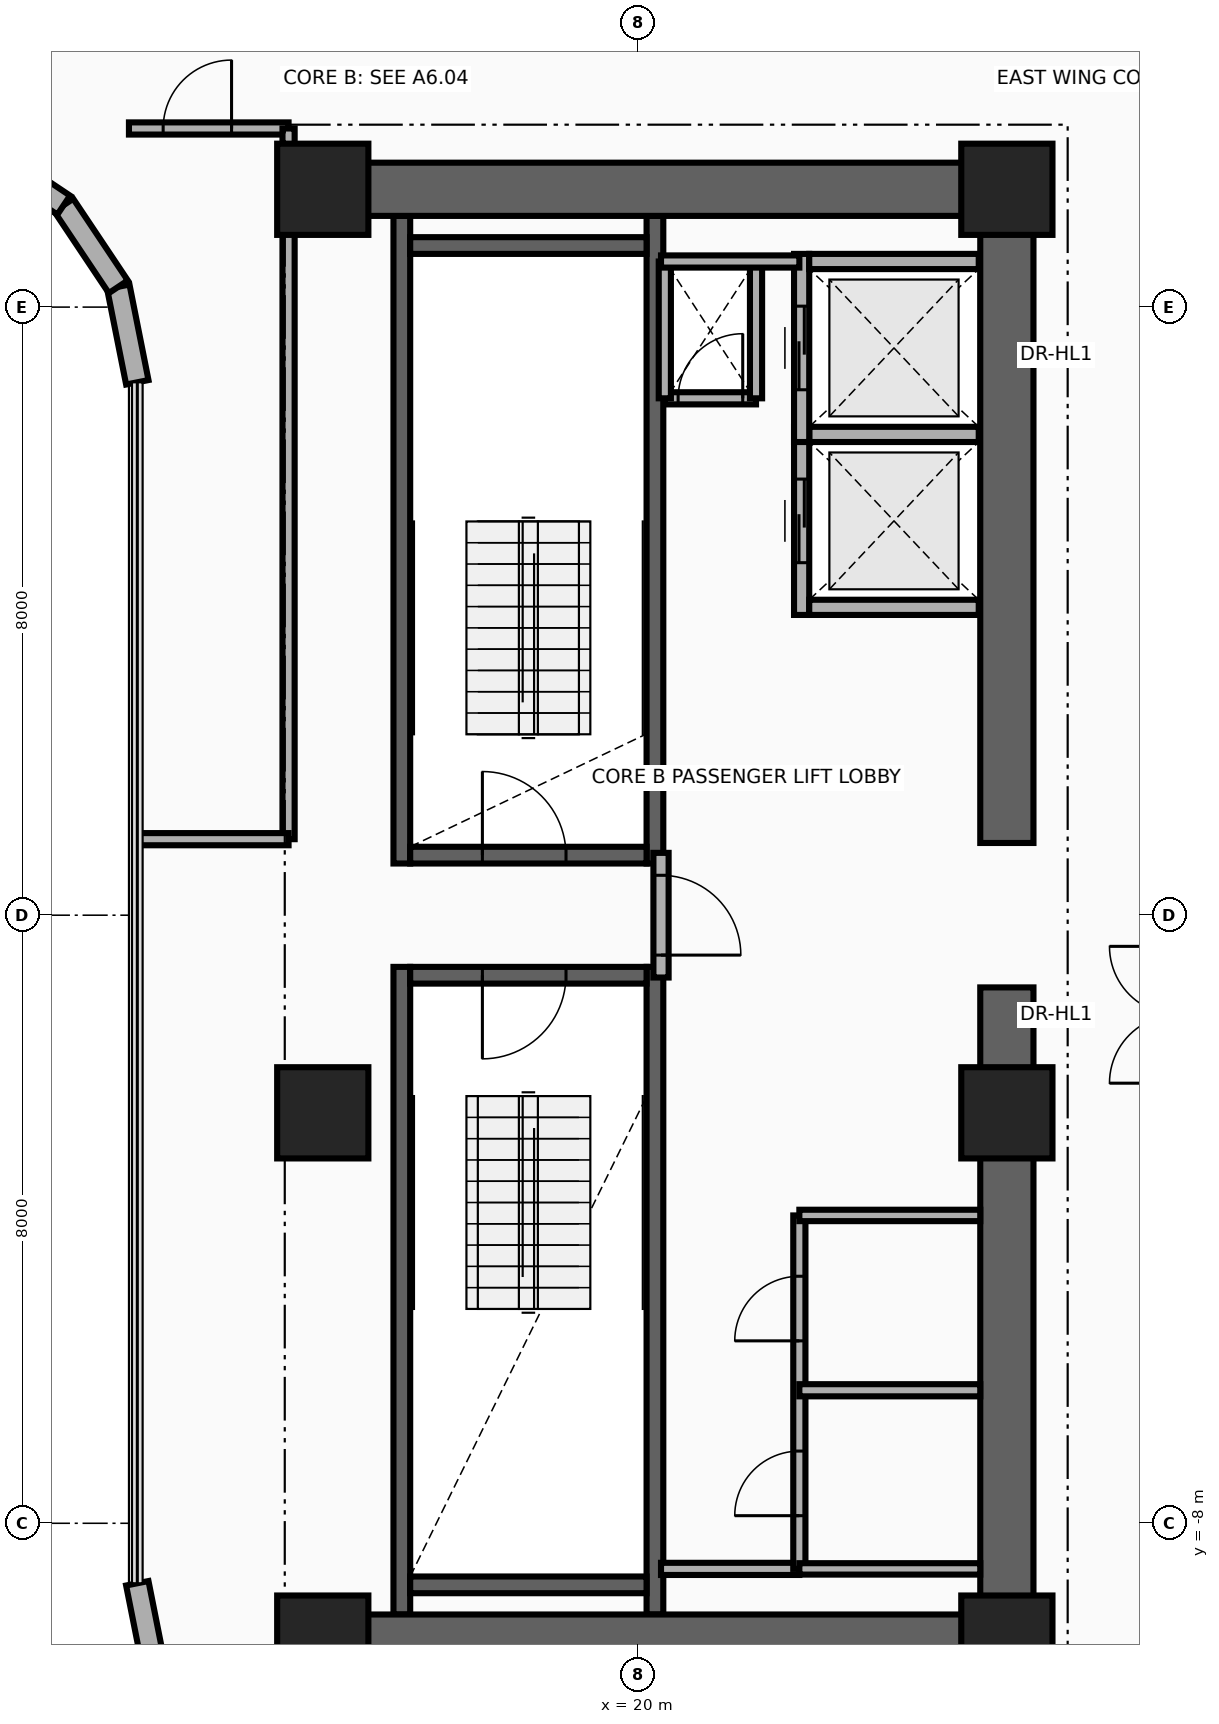
"""IFC4 building model, lengths in metres.
Left out: names, types, materials, properties, quantities, classifications, styles, units other than length and angle.
Written with IfcOpenShell. Run it as: python <this file> out.ifc"""

import sys

from ifc_helpers import new_model, si_unit, direction, frame, frame_2d, origin, origin_2d, place, context, subcontext, project, spatial, rectangle, extrude, source, transform, mapped, element, fill, save


model = new_model("IFC4")
c1 = context("Model", 3, precision=1e-05, world=origin(), true_north=direction((0.0, 1.0)))
c2 = subcontext(c1, "Body", "Model", "MODEL_VIEW")
j1 = project(units=[si_unit("LENGTHUNIT", "METRE"), si_unit("PLANEANGLEUNIT", "RADIAN")], contexts=[c1])
p1 = place(None, origin())
s1 = spatial("IfcSite", under=j1, at=p1, CompositionType="ELEMENT")
p2 = place(p1, origin())
s2 = spatial("IfcBuilding", under=s1, at=p2, CompositionType="ELEMENT")
p3 = place(p2, frame((0.0, 0.0, 131.6)))
s3 = spatial("IfcBuildingStorey", under=s2, at=p3, CompositionType="ELEMENT", Elevation=131.6)
for number, where, z_axis, x_axis in (
    (1, (16.89, 0.68, 0.0), (0.0, 0.0, 1.0), (0.0, 1.0, 0.0)),
    (2, (20.22, 0.68, 0.0), (0.0, 0.0, 1.0), (0.0, 1.0, 0.0)),
):
    element("IfcWall", number, at=place(p3, frame(where, z_axis=z_axis, x_axis=x_axis)), inside=s3, PredefinedType="SHEAR", context=c2, shape_type="SweptSolid", body=[
        extrude(rectangle(XDim=8.52, YDim=0.22, at=frame_2d((4.26, 0.0))), origin(), (0.0, 0.0, 1.0), 3.46),
    ])
p4 = place(p3, frame((17.0, 0.79, 0.0), z_axis=(0.0, 0.0, 1.0), x_axis=(1.0, 0.0, 0.0)))
e3 = element("IfcWall", 3, at=p4, inside=s3, PredefinedType="SHEAR", context=c2, shape_type="SweptSolid", body=[
    extrude(rectangle(XDim=3.11, YDim=0.22, at=frame_2d((1.555, 0.0))), origin(), (0.0, 0.0, 1.0), 3.46),
])
p5 = place(p4, frame((0.95, 0.0, 0.0)))
e4 = element("IfcOpeningElement", 4, at=p5, cuts=e3, PredefinedType="OPENING", context=c2, shape_type="SweptSolid", body=[
    extrude(rectangle(XDim=1.1, YDim=2.15, at=frame_2d((0.55, 1.075))), frame((0.0, 0.125, 0.0), z_axis=(0.0, -1.0, 0.0), x_axis=(1.0, 0.0, 0.0)), (0.0, 0.0, 1.0), 0.25),
])
p6 = place(p3, frame((17.0, 8.81, 0.0), z_axis=(0.0, 0.0, 1.0), x_axis=(1.0, 0.0, 0.0)))
e5 = element("IfcWall", 5, at=p6, inside=s3, PredefinedType="SHEAR", context=c2, shape_type="SweptSolid", body=[
    extrude(rectangle(XDim=3.11, YDim=0.22, at=frame_2d((1.555, 0.0))), origin(), (0.0, 0.0, 1.0), 3.46),
])
for number, where, z_axis, x_axis in (
    (6, (16.89, -9.2, 0.0), (0.0, 0.0, 1.0), (0.0, 1.0, 0.0)),
    (7, (20.22, -9.2, 0.0), (0.0, 0.0, 1.0), (0.0, 1.0, 0.0)),
):
    element("IfcWall", number, at=place(p3, frame(where, z_axis=z_axis, x_axis=x_axis)), inside=s3, PredefinedType="SHEAR", context=c2, shape_type="SweptSolid", body=[
        extrude(rectangle(XDim=8.52, YDim=0.22, at=frame_2d((4.26, 0.0))), origin(), (0.0, 0.0, 1.0), 3.46),
    ])
p7 = place(p3, frame((17.0, -8.81, 0.0), z_axis=(0.0, 0.0, 1.0), x_axis=(1.0, 0.0, 0.0)))
e8 = element("IfcWall", 8, at=p7, inside=s3, PredefinedType="SHEAR", context=c2, shape_type="SweptSolid", body=[
    extrude(rectangle(XDim=3.11, YDim=0.22, at=frame_2d((1.555, 0.0))), origin(), (0.0, 0.0, 1.0), 3.46),
])
p8 = place(p3, frame((17.0, -0.79, 0.0), z_axis=(0.0, 0.0, 1.0), x_axis=(1.0, 0.0, 0.0)))
e9 = element("IfcWall", 9, at=p8, inside=s3, PredefinedType="SHEAR", context=c2, shape_type="SweptSolid", body=[
    extrude(rectangle(XDim=3.11, YDim=0.22, at=frame_2d((1.555, 0.0))), origin(), (0.0, 0.0, 1.0), 3.46),
])
p9 = place(p8, frame((0.95, 0.0, 0.0)))
e10 = element("IfcOpeningElement", 10, at=p9, cuts=e9, PredefinedType="OPENING", context=c2, shape_type="SweptSolid", body=[
    extrude(rectangle(XDim=1.1, YDim=2.15, at=frame_2d((0.55, 1.075))), frame((0.0, 0.125, 0.0), z_axis=(0.0, -1.0, 0.0), x_axis=(1.0, 0.0, 0.0)), (0.0, 0.0, 1.0), 0.25),
])
for number, where, z_axis, x_axis in (
    (11, (24.85, -9.9, 0.0), (0.0, 0.0, 1.0), (0.0, 1.0, 0.0)),
    (12, (24.85, 0.95, 0.0), (0.0, 0.0, 1.0), (0.0, 1.0, 0.0)),
):
    element("IfcWall", number, at=place(p3, frame(where, z_axis=z_axis, x_axis=x_axis)), inside=s3, PredefinedType="SHEAR", context=c2, shape_type="SweptSolid", body=[
        extrude(rectangle(XDim=8.95, YDim=0.7, at=frame_2d((4.475, 0.0))), origin(), (0.0, 0.0, 1.0), 3.46),
    ])
for number, where, z_axis, x_axis in (
    (13, (15.85, 9.55, 0.0), (0.0, 0.0, 1.0), (1.0, 0.0, 0.0)),
    (14, (15.85, -9.55, 0.0), (0.0, 0.0, 1.0), (1.0, 0.0, 0.0)),
):
    element("IfcWall", number, at=place(p3, frame(where, z_axis=z_axis, x_axis=x_axis)), inside=s3, PredefinedType="SHEAR", context=c2, shape_type="SweptSolid", body=[
        extrude(rectangle(XDim=9.0, YDim=0.7, at=frame_2d((4.5, 0.0))), origin(), (0.0, 0.0, 1.0), 3.46),
    ])
m1 = source(origin(), c2, "Body", "SweptSolid", [
    extrude(rectangle(XDim=1.2, YDim=1.2, at=origin_2d()), origin(), (0.0, 0.0, 1.0), 3.7),
])
for number, where, z_axis, x_axis in (
    (15, (15.85, -9.55, 0.0), (0.0, 0.0, 1.0), (1.0, 0.0, 0.0)),
    (16, (24.85, -9.55, 0.0), (0.0, 0.0, 1.0), (1.0, 0.0, 0.0)),
    (17, (15.85, -2.6, 0.0), (0.0, 0.0, 1.0), (1.0, 0.0, 0.0)),
    (18, (24.85, -2.6, 0.0), (0.0, 0.0, 1.0), (1.0, 0.0, 0.0)),
    (19, (15.85, 9.55, 0.0), (0.0, 0.0, 1.0), (1.0, 0.0, 0.0)),
    (20, (24.85, 9.55, 0.0), (0.0, 0.0, 1.0), (1.0, 0.0, 0.0)),
):
    element("IfcColumn", number, at=place(p3, frame(where, z_axis=z_axis, x_axis=x_axis)), inside=s3, PredefinedType="COLUMN", context=c2, shape_type="MappedRepresentation", body=[
        mapped(m1, transform((0.0, 0.0, 0.0), x_axis=(1.0, 0.0, 0.0), y_axis=(0.0, 1.0, 0.0), z_axis=(0.0, 0.0, 1.0), scale=1.0)),
    ])
p10 = place(p3, frame((13.647, -9.982, 0.0), z_axis=(0.0, 0.0, 1.0), x_axis=(-0.195189223115, 0.980765602568, 0.0)))
e21 = element("IfcWall", 21, at=p10, inside=s3, PredefinedType="SOLIDWALL", context=c2, shape_type="SweptSolid", body=[
    extrude(rectangle(XDim=1.216, YDim=0.3, at=frame_2d((0.608, 0.0))), origin(), (0.0, 0.0, 1.0), 3.46),
])
p11 = place(p3, frame((13.41, 7.011, 0.0), z_axis=(0.0, 0.0, 1.0), x_axis=(-0.195090163074, 0.980785312019, 0.0)))
e22 = element("IfcWall", 22, at=p11, inside=s3, PredefinedType="SOLIDWALL", context=c2, shape_type="SweptSolid", body=[
    extrude(rectangle(XDim=1.281, YDim=0.3, at=frame_2d((0.641, 0.0))), origin(), (0.0, 0.0, 1.0), 3.46),
])
for number, where, z_axis, x_axis in (
    (23, (13.16, 8.268, 0.0), (0.0, 0.0, 1.0), (-0.556, 0.831, 0.0)),
    (24, (12.442, 9.342, 0.0), (0.0, 0.0, 1.0), (-0.831, 0.556, 0.0)),
):
    element("IfcWall", number, at=place(p3, frame(where, z_axis=z_axis, x_axis=x_axis)), inside=s3, PredefinedType="SOLIDWALL", context=c2, shape_type="SweptSolid", body=[
        extrude(rectangle(XDim=1.292, YDim=0.3, at=frame_2d((0.646, 0.0))), origin(), (0.0, 0.0, 1.0), 3.46),
    ])
p12 = place(p3, frame((22.15, 3.95, 0.0), z_axis=(0.0, 0.0, 1.0), x_axis=(0.0, 1.0, 0.0)))
e25 = element("IfcWall", 25, at=p12, inside=s3, PredefinedType="MOVABLE", context=c2, shape_type="SweptSolid", body=[
    extrude(rectangle(XDim=2.475, YDim=0.2, at=frame_2d((1.238, 0.0))), origin(), (0.0, 0.0, 1.0), 3.46),
])
p13 = place(p12, frame((0.688, 0.0, 0.0)))
e26 = element("IfcOpeningElement", 26, at=p13, cuts=e25, PredefinedType="OPENING", context=c2, shape_type="SweptSolid", body=[
    extrude(rectangle(XDim=1.1, YDim=2.1, at=frame_2d((0.55, 1.05))), frame((0.0, 0.115, 0.0), z_axis=(0.0, -1.0, 0.0), x_axis=(1.0, 0.0, 0.0)), (0.0, 0.0, 1.0), 0.23),
])
for number, where, z_axis, x_axis in (
    (27, (22.25, 4.05, 0.0), (0.0, 0.0, 1.0), (1.0, 0.0, 0.0)),
    (28, (22.25, 6.325, 0.0), (0.0, 0.0, 1.0), (1.0, 0.0, 0.0)),
):
    element("IfcWall", number, at=place(p3, frame(where, z_axis=z_axis, x_axis=x_axis)), inside=s3, PredefinedType="MOVABLE", context=c2, shape_type="SweptSolid", body=[
        extrude(rectangle(XDim=2.23, YDim=0.2, at=frame_2d((1.115, 0.0))), origin(), (0.0, 0.0, 1.0), 2.245),
    ])
p14 = place(p3, frame((22.15, 6.225, 0.0), z_axis=(0.0, 0.0, 1.0), x_axis=(0.0, 1.0, 0.0)))
e29 = element("IfcWall", 29, at=p14, inside=s3, PredefinedType="MOVABLE", context=c2, shape_type="SweptSolid", body=[
    extrude(rectangle(XDim=2.475, YDim=0.2, at=frame_2d((1.237, 0.0))), origin(), (0.0, 0.0, 1.0), 3.46),
])
p15 = place(p14, frame((0.688, 0.0, 0.0)))
e30 = element("IfcOpeningElement", 30, at=p15, cuts=e29, PredefinedType="OPENING", context=c2, shape_type="SweptSolid", body=[
    extrude(rectangle(XDim=1.1, YDim=2.1, at=frame_2d((0.55, 1.05))), frame((0.0, 0.115, 0.0), z_axis=(0.0, -1.0, 0.0), x_axis=(1.0, 0.0, 0.0)), (0.0, 0.0, 1.0), 0.23),
])
p16 = place(p3, frame((22.25, 8.6, 0.0), z_axis=(0.0, 0.0, 1.0), x_axis=(1.0, 0.0, 0.0)))
e31 = element("IfcWall", 31, at=p16, inside=s3, PredefinedType="MOVABLE", context=c2, shape_type="SweptSolid", body=[
    extrude(rectangle(XDim=2.23, YDim=0.2, at=frame_2d((1.115, 0.0))), origin(), (0.0, 0.0, 1.0), 2.245),
])
p17 = place(p3, frame((20.3, -0.82, 0.0), z_axis=(0.0, 0.0, 1.0), x_axis=(0.0, 1.0, 0.0)))
e32 = element("IfcWall", 32, at=p17, inside=s3, PredefinedType="PARTITIONING", context=c2, shape_type="SweptSolid", body=[
    extrude(rectangle(XDim=1.64, YDim=0.2, at=frame_2d((0.82, 0.0))), origin(), (0.0, 0.0, 1.0), 3.46),
])
p18 = place(p17, frame((0.295, 0.0, 0.0)))
e33 = element("IfcOpeningElement", 33, at=p18, cuts=e32, PredefinedType="OPENING", context=c2, shape_type="SweptSolid", body=[
    extrude(rectangle(XDim=1.05, YDim=2.15, at=frame_2d((0.525, 1.075))), frame((0.0, 0.115, 0.0), z_axis=(0.0, -1.0, 0.0), x_axis=(1.0, 0.0, 0.0)), (0.0, 0.0, 1.0), 0.23),
])
p19 = place(p3, frame((20.35, 6.8, 0.0), z_axis=(0.0, 0.0, 1.0), x_axis=(1.0, 0.0, 0.0)))
e34 = element("IfcWall", 34, at=p19, inside=s3, PredefinedType="PARTITIONING", context=c2, shape_type="SweptSolid", body=[
    extrude(rectangle(XDim=1.2, YDim=0.16, at=frame_2d((0.6, 0.0))), origin(), (0.0, 0.0, 1.0), 3.46),
])
p20 = place(p19, frame((0.175, 0.0, 0.0)))
e35 = element("IfcOpeningElement", 35, at=p20, cuts=e34, PredefinedType="OPENING", context=c2, shape_type="SweptSolid", body=[
    extrude(rectangle(XDim=0.85, YDim=2.05, at=frame_2d((0.425, 1.025))), frame((0.0, 0.095, 0.0), z_axis=(0.0, -1.0, 0.0), x_axis=(1.0, 0.0, 0.0)), (0.0, 0.0, 1.0), 0.19),
])
for number, where, z_axis, x_axis in (
    (36, (21.55, 6.8, 0.0), (0.0, 0.0, 1.0), (0.0, 1.0, 0.0)),
    (37, (20.35, 6.8, 0.0), (0.0, 0.0, 1.0), (0.0, 1.0, 0.0)),
):
    element("IfcWall", number, at=place(p3, frame(where, z_axis=z_axis, x_axis=x_axis)), inside=s3, PredefinedType="PARTITIONING", context=c2, shape_type="SweptSolid", body=[
        extrude(rectangle(XDim=1.8, YDim=0.16, at=frame_2d((0.9, 0.0))), origin(), (0.0, 0.0, 1.0), 3.46),
    ])
for number, where, z_axis, x_axis in (
    (38, (20.3, -8.6, 0.0), (0.0, 0.0, 1.0), (1.0, 0.0, 0.0)),
    (39, (20.3, 8.6, 0.0), (0.0, 0.0, 1.0), (1.0, 0.0, 0.0)),
):
    element("IfcWall", number, at=place(p3, frame(where, z_axis=z_axis, x_axis=x_axis)), inside=s3, PredefinedType="PARTITIONING", context=c2, shape_type="SweptSolid", body=[
        extrude(rectangle(XDim=1.82, YDim=0.16, at=frame_2d((0.91, 0.0))), origin(), (0.0, 0.0, 1.0), 3.46),
    ])
p21 = place(p3, frame((22.12, -8.6, 0.0), z_axis=(0.0, 0.0, 1.0), x_axis=(0.0, 1.0, 0.0)))
e40 = element("IfcWall", 40, at=p21, inside=s3, PredefinedType="PARTITIONING", context=c2, shape_type="SweptSolid", body=[
    extrude(rectangle(XDim=4.65, YDim=0.16, at=frame_2d((2.325, 0.0))), origin(), (0.0, 0.0, 1.0), 3.46),
])
p22 = place(p21, frame((0.7, 0.0, 0.0)))
e41 = element("IfcOpeningElement", 41, at=p22, cuts=e40, PredefinedType="OPENING", context=c2, shape_type="SweptSolid", body=[
    extrude(rectangle(XDim=0.85, YDim=2.05, at=frame_2d((0.425, 1.025))), frame((0.0, 0.095, 0.0), z_axis=(0.0, -1.0, 0.0), x_axis=(1.0, 0.0, 0.0)), (0.0, 0.0, 1.0), 0.19),
])
p23 = place(p21, frame((3.0, 0.0, 0.0)))
e42 = element("IfcOpeningElement", 42, at=p23, cuts=e40, PredefinedType="OPENING", context=c2, shape_type="SweptSolid", body=[
    extrude(rectangle(XDim=0.85, YDim=2.05, at=frame_2d((0.425, 1.025))), frame((0.0, 0.095, 0.0), z_axis=(0.0, -1.0, 0.0), x_axis=(1.0, 0.0, 0.0)), (0.0, 0.0, 1.0), 0.19),
])
for number, where, z_axis, x_axis in (
    (43, (22.12, -3.95, 0.0), (0.0, 0.0, 1.0), (1.0, 0.0, 0.0)),
    (44, (22.12, -8.6, 0.0), (0.0, 0.0, 1.0), (1.0, 0.0, 0.0)),
):
    element("IfcWall", number, at=place(p3, frame(where, z_axis=z_axis, x_axis=x_axis)), inside=s3, PredefinedType="PARTITIONING", context=c2, shape_type="SweptSolid", body=[
        extrude(rectangle(XDim=2.38, YDim=0.15, at=frame_2d((1.19, 0.0))), origin(), (0.0, 0.0, 1.0), 3.46),
    ])
p24 = place(p3, frame((22.12, -6.25, 0.0), z_axis=(0.0, 0.0, 1.0), x_axis=(1.0, 0.0, 0.0)))
e45 = element("IfcWall", 45, at=p24, inside=s3, PredefinedType="PARTITIONING", context=c2, shape_type="SweptSolid", body=[
    extrude(rectangle(XDim=2.38, YDim=0.16, at=frame_2d((1.19, 0.0))), origin(), (0.0, 0.0, 1.0), 3.46),
])
p25 = place(p3, frame((13.3, 10.35, 0.0), z_axis=(0.0, 0.0, 1.0), x_axis=(1.0, 0.0, 0.0)))
e46 = element("IfcWall", 46, at=p25, inside=s3, PredefinedType="PARTITIONING", context=c2, shape_type="SweptSolid", body=[
    extrude(rectangle(XDim=2.1, YDim=0.16, at=frame_2d((1.05, 0.0))), origin(), (0.0, 0.0, 1.0), 2.666),
])
p26 = place(p25, frame((0.45, 0.0, 0.0)))
e47 = element("IfcOpeningElement", 47, at=p26, cuts=e46, PredefinedType="OPENING", context=c2, shape_type="SweptSolid", body=[
    extrude(rectangle(XDim=0.9, YDim=2.1, at=frame_2d((0.45, 1.05))), frame((0.0, 0.095, 0.0), z_axis=(0.0, -1.0, 0.0), x_axis=(1.0, 0.0, 0.0)), (0.0, 0.0, 1.0), 0.19),
])
p27 = place(p3, frame((15.4, 1.0, 0.0), z_axis=(0.0, 0.0, 1.0), x_axis=(0.0, 1.0, 0.0)))
e48 = element("IfcWall", 48, at=p27, inside=s3, PredefinedType="PARTITIONING", context=c2, shape_type="SweptSolid", body=[
    extrude(rectangle(XDim=9.35, YDim=0.16, at=frame_2d((4.675, 0.0))), origin(), (0.0, 0.0, 1.0), 2.245),
])
p28 = place(p3, frame((13.41, 1.0, 0.0), z_axis=(0.0, 0.0, 1.0), x_axis=(1.0, 0.0, 0.0)))
e49 = element("IfcWall", 49, at=p28, inside=s3, PredefinedType="PARTITIONING", context=c2, shape_type="SweptSolid", body=[
    extrude(rectangle(XDim=1.99, YDim=0.16, at=frame_2d((0.995, 0.0))), origin(), (0.0, 0.0, 1.0), 2.245),
])
p29 = place(p13, origin())
e50 = element("IfcDoor", 50, at=p29, inside=s3, OperationType="DOUBLE_DOOR_SLIDING", PredefinedType="DOOR", context=c2, shape_type="SweptSolid", body=[
    extrude(rectangle(XDim=1.1, YDim=2.1, at=frame_2d((0.55, 1.05))), frame((0.0, 0.025, 0.0), z_axis=(0.0, -1.0, 0.0), x_axis=(1.0, 0.0, 0.0)), (0.0, 0.0, 1.0), 0.05),
])
fill(e26, e50)
p30 = place(p15, origin())
e51 = element("IfcDoor", 51, at=p30, inside=s3, OperationType="DOUBLE_DOOR_SLIDING", PredefinedType="DOOR", context=c2, shape_type="SweptSolid", body=[
    extrude(rectangle(XDim=1.1, YDim=2.1, at=frame_2d((0.55, 1.05))), frame((0.0, 0.025, 0.0), z_axis=(0.0, -1.0, 0.0), x_axis=(1.0, 0.0, 0.0)), (0.0, 0.0, 1.0), 0.05),
])
fill(e30, e51)
p31 = place(p18, frame((1.05, 0.0, 0.0), z_axis=(0.0, 0.0, 1.0), x_axis=(-1.0, 0.0, 0.0)))
e52 = element("IfcDoor", 52, at=p31, inside=s3, OperationType="SINGLE_SWING_LEFT", PredefinedType="DOOR", context=c2, shape_type="SweptSolid", body=[
    extrude(rectangle(XDim=1.05, YDim=2.15, at=frame_2d((0.525, 1.075))), frame((0.0, 0.025, 0.0), z_axis=(0.0, -1.0, 0.0), x_axis=(1.0, 0.0, 0.0)), (0.0, 0.0, 1.0), 0.05),
])
fill(e33, e52)
p32 = place(p5, origin())
e53 = element("IfcDoor", 53, at=p32, inside=s3, OperationType="SINGLE_SWING_RIGHT", PredefinedType="DOOR", context=c2, shape_type="SweptSolid", body=[
    extrude(rectangle(XDim=1.1, YDim=2.15, at=frame_2d((0.55, 1.075))), frame((0.0, 0.025, 0.0), z_axis=(0.0, -1.0, 0.0), x_axis=(1.0, 0.0, 0.0)), (0.0, 0.0, 1.0), 0.05),
])
fill(e4, e53)
p33 = place(p9, frame((1.1, 0.0, 0.0), z_axis=(0.0, 0.0, 1.0), x_axis=(-1.0, 0.0, 0.0)))
e54 = element("IfcDoor", 54, at=p33, inside=s3, OperationType="SINGLE_SWING_LEFT", PredefinedType="DOOR", context=c2, shape_type="SweptSolid", body=[
    extrude(rectangle(XDim=1.1, YDim=2.15, at=frame_2d((0.55, 1.075))), frame((0.0, 0.025, 0.0), z_axis=(0.0, -1.0, 0.0), x_axis=(1.0, 0.0, 0.0)), (0.0, 0.0, 1.0), 0.05),
])
fill(e10, e54)
p34 = place(p20, origin())
e55 = element("IfcDoor", 55, at=p34, inside=s3, OperationType="SINGLE_SWING_RIGHT", PredefinedType="DOOR", context=c2, shape_type="SweptSolid", body=[
    extrude(rectangle(XDim=0.85, YDim=2.05, at=frame_2d((0.425, 1.025))), frame((0.0, 0.025, 0.0), z_axis=(0.0, -1.0, 0.0), x_axis=(1.0, 0.0, 0.0)), (0.0, 0.0, 1.0), 0.05),
])
fill(e35, e55)
p35 = place(p22, origin())
e56 = element("IfcDoor", 56, at=p35, inside=s3, OperationType="SINGLE_SWING_LEFT", PredefinedType="DOOR", context=c2, shape_type="SweptSolid", body=[
    extrude(rectangle(XDim=0.85, YDim=2.05, at=frame_2d((0.425, 1.025))), frame((0.0, 0.025, 0.0), z_axis=(0.0, -1.0, 0.0), x_axis=(1.0, 0.0, 0.0)), (0.0, 0.0, 1.0), 0.05),
])
fill(e41, e56)
p36 = place(p23, origin())
e57 = element("IfcDoor", 57, at=p36, inside=s3, OperationType="SINGLE_SWING_RIGHT", PredefinedType="DOOR", context=c2, shape_type="SweptSolid", body=[
    extrude(rectangle(XDim=0.85, YDim=2.05, at=frame_2d((0.425, 1.025))), frame((0.0, 0.025, 0.0), z_axis=(0.0, -1.0, 0.0), x_axis=(1.0, 0.0, 0.0)), (0.0, 0.0, 1.0), 0.05),
])
fill(e42, e57)
p37 = place(p26, origin())
e58 = element("IfcDoor", 58, at=p37, inside=s3, OperationType="SINGLE_SWING_RIGHT", PredefinedType="DOOR", context=c2, shape_type="SweptSolid", body=[
    extrude(rectangle(XDim=0.9, YDim=2.1, at=frame_2d((0.45, 1.05))), frame((0.0, 0.025, 0.0), z_axis=(0.0, -1.0, 0.0), x_axis=(1.0, 0.0, 0.0)), (0.0, 0.0, 1.0), 0.05),
])
fill(e47, e58)
save(model, sys.argv[1])
